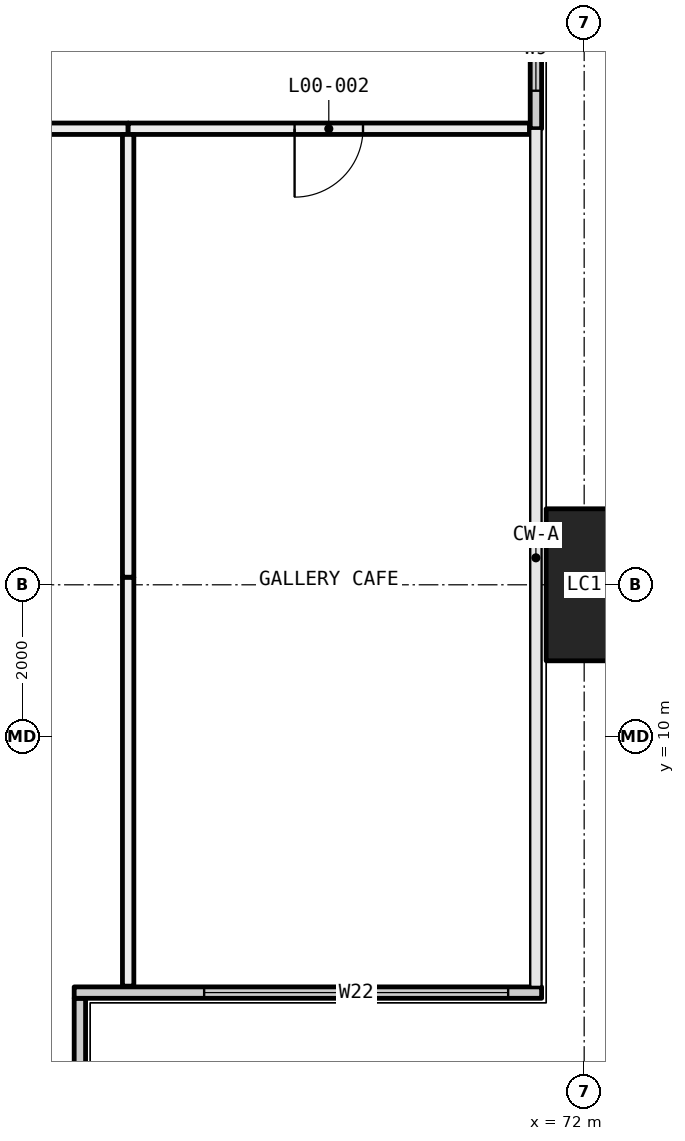
"""IFC4 building model, lengths in metres.
Left out: names, types, materials, properties, quantities, classifications, styles, units other than length and angle.
Written with IfcOpenShell. Run it as: python <this file> out.ifc"""

import sys

from ifc_helpers import new_model, si_unit, direction, frame, frame_2d, origin, origin_2d, place, context, subcontext, project, spatial, rectangle, hollow_rectangle, extrude, element, fill, save


model = new_model("IFC4")
c1 = context("Model", 3, precision=1e-05, world=origin(), true_north=direction((0.0, 1.0)))
c2 = subcontext(c1, "Body", "Model", "MODEL_VIEW")
j1 = project(units=[si_unit("LENGTHUNIT", "METRE"), si_unit("PLANEANGLEUNIT", "RADIAN")], contexts=[c1])
p1 = place(None, origin())
s1 = spatial("IfcSite", under=j1, at=p1, CompositionType="ELEMENT")
p2 = place(p1, origin())
s2 = spatial("IfcBuilding", under=s1, at=p2, CompositionType="ELEMENT")
p3 = place(p2, origin())
s3 = spatial("IfcBuildingStorey", under=s2, at=p3, CompositionType="ELEMENT", Elevation=0.0)
p4 = place(p3, frame((72.0, 12.0, -0.9), z_axis=(0.0, 0.0, 1.0), x_axis=(0.0, 1.0, 0.0)))
e1 = element("IfcColumn", 1, at=p4, inside=s3, PredefinedType="COLUMN", context=c2, shape_type="SweptSolid", body=[
    extrude(hollow_rectangle(XDim=2.0, YDim=1.0, WallThickness=0.08, at=origin_2d()), origin(), (0.0, 0.0, 1.0), 6.5),
])
p5 = place(p3, frame((65.365, 0.71, 0.0), z_axis=(0.0, 0.0, 1.0), x_axis=(0.0, 1.0, 0.0)))
e2 = element("IfcWall", 2, at=p5, inside=s3, PredefinedType="ELEMENTEDWALL", context=c2, shape_type="SweptSolid", body=[
    extrude(rectangle(XDim=5.85, YDim=0.15, at=frame_2d((2.925, 0.0))), origin(), (0.0, 0.0, 1.0), 5.6),
])
p6 = place(p5, frame((0.29, 0.0, 0.45)))
e3 = element("IfcOpeningElement", 3, at=p6, cuts=e2, PredefinedType="OPENING", context=c2, shape_type="SweptSolid", body=[
    extrude(rectangle(XDim=4.0, YDim=5.1, at=frame_2d((2.0, 2.55))), frame((0.0, 0.085, 0.0), z_axis=(0.0, -1.0, 0.0), x_axis=(1.0, 0.0, 0.0)), (0.0, 0.0, 1.0), 0.17),
])
p7 = place(p3, frame((65.29, 6.635, 0.0), z_axis=(0.0, 0.0, 1.0), x_axis=(1.0, 0.0, 0.0)))
e4 = element("IfcWall", 4, at=p7, inside=s3, PredefinedType="ELEMENTEDWALL", context=c2, shape_type="SweptSolid", body=[
    extrude(rectangle(XDim=6.15, YDim=0.15, at=frame_2d((3.075, 0.0))), origin(), (0.0, 0.0, 1.0), 5.6),
])
p8 = place(p7, frame((1.71, 0.0, 0.45)))
e5 = element("IfcOpeningElement", 5, at=p8, cuts=e4, PredefinedType="OPENING", context=c2, shape_type="SweptSolid", body=[
    extrude(rectangle(XDim=4.0, YDim=5.1, at=frame_2d((2.0, 2.55))), frame((0.0, 0.085, 0.0), z_axis=(0.0, -1.0, 0.0), x_axis=(1.0, 0.0, 0.0)), (0.0, 0.0, 1.0), 0.17),
])
p9 = place(p3, frame((71.365, 18.0, 0.0), z_axis=(0.0, 0.0, 1.0), x_axis=(0.0, 1.0, 0.0)))
e6 = element("IfcWall", 6, at=p9, inside=s3, PredefinedType="ELEMENTEDWALL", context=c2, shape_type="SweptSolid", body=[
    extrude(rectangle(XDim=6.0, YDim=0.15, at=frame_2d((3.0, 0.0))), origin(), (0.0, 0.0, 1.0), 5.6),
])
p10 = place(p9, frame((0.5, 0.0, 0.45)))
e7 = element("IfcOpeningElement", 7, at=p10, cuts=e6, PredefinedType="OPENING", context=c2, shape_type="SweptSolid", body=[
    extrude(rectangle(XDim=1.1, YDim=5.1, at=frame_2d((0.55, 2.55))), frame((0.0, 0.085, 0.0), z_axis=(0.0, -1.0, 0.0), x_axis=(1.0, 0.0, 0.0)), (0.0, 0.0, 1.0), 0.17),
])
p11 = place(p9, frame((4.4, 0.0, 0.45)))
e8 = element("IfcOpeningElement", 8, at=p11, cuts=e6, PredefinedType="OPENING", context=c2, shape_type="SweptSolid", body=[
    extrude(rectangle(XDim=1.1, YDim=5.1, at=frame_2d((0.55, 2.55))), frame((0.0, 0.085, 0.0), z_axis=(0.0, -1.0, 0.0), x_axis=(1.0, 0.0, 0.0)), (0.0, 0.0, 1.0), 0.17),
])
p12 = place(p9, frame((1.8, 0.0, 0.0)))
e9 = element("IfcOpeningElement", 9, at=p12, cuts=e6, PredefinedType="OPENING", context=c2, shape_type="SweptSolid", body=[
    extrude(rectangle(XDim=2.4, YDim=2.7, at=frame_2d((1.2, 1.35))), frame((0.0, 0.085, 0.0), z_axis=(0.0, -1.0, 0.0), x_axis=(1.0, 0.0, 0.0)), (0.0, 0.0, 1.0), 0.17),
])
p13 = place(p9, frame((1.8, 0.0, 2.9)))
e10 = element("IfcOpeningElement", 10, at=p13, cuts=e6, PredefinedType="OPENING", context=c2, shape_type="SweptSolid", body=[
    extrude(rectangle(XDim=2.4, YDim=2.65, at=frame_2d((1.2, 1.325))), frame((0.0, 0.085, 0.0), z_axis=(0.0, -1.0, 0.0), x_axis=(1.0, 0.0, 0.0)), (0.0, 0.0, 1.0), 0.17),
])
p14 = place(p3, frame((60.0, 18.0, 0.0), z_axis=(0.0, 0.0, 1.0), x_axis=(1.0, 0.0, 0.0)))
e11 = element("IfcWall", 11, at=p14, inside=s3, PredefinedType="PARTITIONING", context=c2, shape_type="SweptSolid", body=[
    extrude(rectangle(XDim=6.0, YDim=0.15, at=frame_2d((3.0, 0.0))), origin(), (0.0, 0.0, 1.0), 5.6),
])
p15 = place(p3, frame((66.0, 18.0, 0.0), z_axis=(0.0, 0.0, 1.0), x_axis=(1.0, 0.0, 0.0)))
e12 = element("IfcWall", 12, at=p15, inside=s3, PredefinedType="PARTITIONING", context=c2, shape_type="SweptSolid", body=[
    extrude(rectangle(XDim=5.28, YDim=0.15, at=frame_2d((2.64, 0.0))), origin(), (0.0, 0.0, 1.0), 5.6),
])
p16 = place(p15, frame((2.19, 0.0, 0.0)))
e13 = element("IfcOpeningElement", 13, at=p16, cuts=e12, PredefinedType="OPENING", context=c2, shape_type="SweptSolid", body=[
    extrude(rectangle(XDim=0.9, YDim=2.1, at=frame_2d((0.45, 1.05))), frame((0.0, 0.085, 0.0), z_axis=(0.0, -1.0, 0.0), x_axis=(1.0, 0.0, 0.0)), (0.0, 0.0, 1.0), 0.17),
])
p17 = place(p3, frame((66.0, 6.72, 0.0), z_axis=(0.0, 0.0, 1.0), x_axis=(0.0, 1.0, 0.0)))
e14 = element("IfcWall", 14, at=p17, inside=s3, PredefinedType="PARTITIONING", context=c2, shape_type="SweptSolid", body=[
    extrude(rectangle(XDim=5.38, YDim=0.15, at=frame_2d((2.69, 0.0))), origin(), (0.0, 0.0, 1.0), 5.0),
])
p18 = place(p3, frame((66.0, 12.1, 0.0), z_axis=(0.0, 0.0, 1.0), x_axis=(0.0, 1.0, 0.0)))
e15 = element("IfcWall", 15, at=p18, inside=s3, PredefinedType="PARTITIONING", context=c2, shape_type="SweptSolid", body=[
    extrude(rectangle(XDim=5.825, YDim=0.15, at=frame_2d((2.913, 0.0))), origin(), (0.0, 0.0, 1.0), 5.6),
])
p19 = place(p8, origin())
e16 = element("IfcWindow", 16, at=p19, inside=s3, PartitioningType="SINGLE_PANEL", PredefinedType="WINDOW", context=c2, shape_type="SweptSolid", body=[
    extrude(rectangle(XDim=4.0, YDim=5.1, at=frame_2d((2.0, 2.55))), frame((0.0, 0.03, 0.0), z_axis=(0.0, -1.0, 0.0), x_axis=(1.0, 0.0, 0.0)), (0.0, 0.0, 1.0), 0.06),
])
fill(e5, e16)
p20 = place(p10, origin())
e17 = element("IfcWindow", 17, at=p20, inside=s3, PartitioningType="SINGLE_PANEL", PredefinedType="WINDOW", context=c2, shape_type="SweptSolid", body=[
    extrude(rectangle(XDim=1.1, YDim=5.1, at=frame_2d((0.55, 2.55))), frame((0.0, 0.03, 0.0), z_axis=(0.0, -1.0, 0.0), x_axis=(1.0, 0.0, 0.0)), (0.0, 0.0, 1.0), 0.06),
])
fill(e7, e17)
p21 = place(p16, frame((0.9, 0.0, 0.0), x_axis=(-1.0, 0.0, 0.0)))
e18 = element("IfcDoor", 18, at=p21, inside=s3, OperationType="SINGLE_SWING_LEFT", PredefinedType="DOOR", context=c2, shape_type="SweptSolid", body=[
    extrude(rectangle(XDim=0.9, YDim=2.1, at=frame_2d((0.45, 1.05))), frame((0.0, 0.025, 0.0), z_axis=(0.0, -1.0, 0.0), x_axis=(1.0, 0.0, 0.0)), (0.0, 0.0, 1.0), 0.05),
])
fill(e13, e18)
save(model, sys.argv[1])
